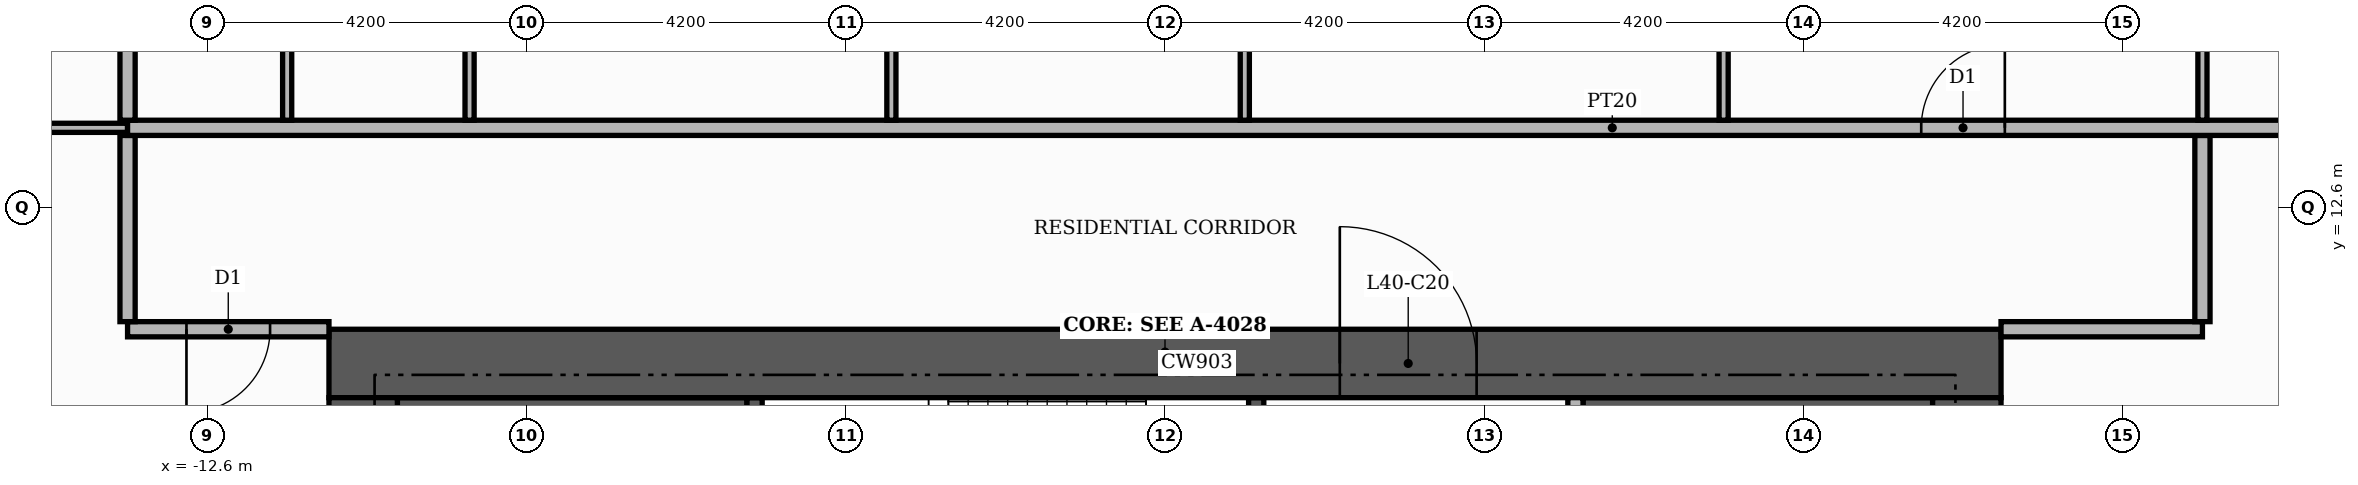
"""IFC4 building model, lengths in metres.
Left out: names, types, materials, properties, quantities, classifications, styles, units other than length and angle.
Written with IfcOpenShell. Run it as: python <this file> out.ifc"""

import sys

from ifc_helpers import new_model, si_unit, direction, frame, frame_2d, origin, place, context, subcontext, project, spatial, rectangle, extrude, element, fill, save


model = new_model("IFC4")
c1 = context("Model", 3, precision=1e-05, world=origin(), true_north=direction((0.0, 1.0)))
c2 = subcontext(c1, "Body", "Model", "MODEL_VIEW")
j1 = project(units=[si_unit("LENGTHUNIT", "METRE"), si_unit("PLANEANGLEUNIT", "RADIAN")], contexts=[c1])
p1 = place(None, origin())
s1 = spatial("IfcSite", under=j1, at=p1, CompositionType="ELEMENT")
p2 = place(p1, origin())
s2 = spatial("IfcBuilding", under=s1, at=p2, CompositionType="ELEMENT")
p3 = place(p2, frame((0.0, 0.0, 168.9)))
s3 = spatial("IfcBuildingStorey", under=s2, at=p3, CompositionType="ELEMENT", Elevation=168.9)
for number, where, z_axis, x_axis in (
    (1, (-10.1, 9.15, 0.0), (0.0, 0.0, 1.0), (1.0, 0.0, 0.0)),
    (2, (5.5, 9.15, 0.0), (0.0, 0.0, 1.0), (1.0, 0.0, 0.0)),
):
    element("IfcWall", number, at=place(p3, frame(where, z_axis=z_axis, x_axis=x_axis)), inside=s3, PredefinedType="SHEAR", context=c2, shape_type="SweptSolid", body=[
        extrude(rectangle(XDim=4.6, YDim=1.9, at=frame_2d((2.3, 0.0))), origin(), (0.0, 0.0, 1.0), 3.48),
    ])
p4 = place(p3, frame((-5.4, 7.25, 0.0), z_axis=(0.0, 0.0, 1.0), x_axis=(0.0, 1.0, 0.0)))
e3 = element("IfcWall", 3, at=p4, inside=s3, PredefinedType="SHEAR", context=c2, shape_type="SweptSolid", body=[
    extrude(rectangle(XDim=2.85, YDim=0.2, at=frame_2d((1.425, 0.0))), origin(), (0.0, 0.0, 1.0), 3.48),
])
p5 = place(p3, frame((1.2, 7.25, 0.0), z_axis=(0.0, 0.0, 1.0), x_axis=(0.0, 1.0, 0.0)))
e4 = element("IfcWall", 4, at=p5, inside=s3, PredefinedType="SHEAR", context=c2, shape_type="SweptSolid", body=[
    extrude(rectangle(XDim=2.85, YDim=0.2, at=frame_2d((1.425, 0.0))), origin(), (0.0, 0.0, 1.0), 3.48),
])
p6 = place(p5, frame((0.85, 0.0, 0.0)))
e5 = element("IfcOpeningElement", 5, at=p6, cuts=e4, PredefinedType="OPENING", context=c2, shape_type="SweptSolid", body=[
    extrude(rectangle(XDim=1.0, YDim=2.1, at=frame_2d((0.5, 1.05))), frame((0.0, 0.11, 0.0), z_axis=(0.0, -1.0, 0.0), x_axis=(1.0, 0.0, 0.0)), (0.0, 0.0, 1.0), 0.22),
])
p7 = place(p3, frame((-11.0, 10.55, 0.0), z_axis=(0.0, 0.0, 1.0), x_axis=(1.0, 0.0, 0.0)))
e6 = element("IfcWall", 6, at=p7, inside=s3, PredefinedType="SHEAR", context=c2, shape_type="SweptSolid", body=[
    extrude(rectangle(XDim=22.0, YDim=0.9, at=frame_2d((11.0, 0.0))), origin(), (0.0, 0.0, 1.0), 3.48),
])
p8 = place(p7, frame((13.3, 0.0, 0.0)))
e7 = element("IfcOpeningElement", 7, at=p8, cuts=e6, PredefinedType="OPENING", context=c2, shape_type="SweptSolid", body=[
    extrude(rectangle(XDim=1.8, YDim=2.2, at=frame_2d((0.9, 1.1))), frame((0.0, 0.46, 0.0), z_axis=(0.0, -1.0, 0.0), x_axis=(1.0, 0.0, 0.0)), (0.0, 0.0, 1.0), 0.92),
])
for number, where, z_axis, x_axis in (
    (8, (-10.55, -10.1, 0.0), (0.0, 0.0, 1.0), (0.0, 1.0, 0.0)),
    (9, (10.55, -10.1, 0.0), (0.0, 0.0, 1.0), (0.0, 1.0, 0.0)),
):
    element("IfcWall", number, at=place(p3, frame(where, z_axis=z_axis, x_axis=x_axis)), inside=s3, PredefinedType="SHEAR", context=c2, shape_type="SweptSolid", body=[
        extrude(rectangle(XDim=20.2, YDim=0.9, at=frame_2d((10.1, 0.0))), origin(), (0.0, 0.0, 1.0), 3.48),
    ])
p9 = place(p3, frame((5.4, 5.5, 0.0), z_axis=(0.0, 0.0, 1.0), x_axis=(0.0, 1.0, 0.0)))
e10 = element("IfcWall", 10, at=p9, inside=s3, PredefinedType="PARTITIONING", context=c2, shape_type="SweptSolid", body=[
    extrude(rectangle(XDim=4.6, YDim=0.2, at=frame_2d((2.3, 0.0))), origin(), (0.0, 0.0, 1.0), 3.48),
])
p10 = place(p9, frame((0.25, 0.0, 0.0)))
e11 = element("IfcOpeningElement", 11, at=p10, cuts=e10, PredefinedType="OPENING", context=c2, shape_type="SweptSolid", body=[
    extrude(rectangle(XDim=1.0, YDim=2.1, at=frame_2d((0.5, 1.05))), frame((0.0, 0.11, 0.0), z_axis=(0.0, -1.0, 0.0), x_axis=(1.0, 0.0, 0.0)), (0.0, 0.0, 1.0), 0.22),
])
p11 = place(p3, frame((-13.65, 11.0, 0.0), z_axis=(0.0, 0.0, 1.0), x_axis=(1.0, 0.0, 0.0)))
e12 = element("IfcWall", 12, at=p11, inside=s3, PredefinedType="PARTITIONING", context=c2, shape_type="SweptSolid", body=[
    extrude(rectangle(XDim=2.65, YDim=0.2, at=frame_2d((1.325, 0.0))), origin(), (0.0, 0.0, 1.0), 3.48),
])
p12 = place(p11, frame((0.775, 0.0, 0.0)))
e13 = element("IfcOpeningElement", 13, at=p12, cuts=e12, PredefinedType="OPENING", context=c2, shape_type="SweptSolid", body=[
    extrude(rectangle(XDim=1.1, YDim=2.4, at=frame_2d((0.55, 1.2))), frame((0.0, 0.11, 0.0), z_axis=(0.0, -1.0, 0.0), x_axis=(1.0, 0.0, 0.0)), (0.0, 0.0, 1.0), 0.22),
])
p13 = place(p3, frame((11.0, 11.0, 0.0), z_axis=(0.0, 0.0, 1.0), x_axis=(1.0, 0.0, 0.0)))
e14 = element("IfcWall", 14, at=p13, inside=s3, PredefinedType="PARTITIONING", context=c2, shape_type="SweptSolid", body=[
    extrude(rectangle(XDim=2.65, YDim=0.2, at=frame_2d((1.325, 0.0))), origin(), (0.0, 0.0, 1.0), 3.48),
])
for number, where, z_axis, x_axis in (
    (15, (-13.65, 11.1, 0.0), (0.0, 0.0, 1.0), (0.0, 1.0, 0.0)),
    (16, (13.65, 11.1, 0.0), (0.0, 0.0, 1.0), (0.0, 1.0, 0.0)),
):
    element("IfcWall", number, at=place(p3, frame(where, z_axis=z_axis, x_axis=x_axis)), inside=s3, PredefinedType="PARTITIONING", context=c2, shape_type="SweptSolid", body=[
        extrude(rectangle(XDim=2.45, YDim=0.2, at=frame_2d((1.225, 0.0))), origin(), (0.0, 0.0, 1.0), 3.48),
    ])
p14 = place(p3, frame((-20.72, 13.65, 0.0), z_axis=(0.0, 0.0, 1.0), x_axis=(1.0, 0.0, 0.0)))
e17 = element("IfcWall", 17, at=p14, inside=s3, PredefinedType="PARTITIONING", context=c2, shape_type="SweptSolid", body=[
    extrude(rectangle(XDim=7.07, YDim=0.12, at=frame_2d((3.535, 0.0))), origin(), (0.0, 0.0, 1.0), 3.48),
])
p15 = place(p14, frame((3.085, 0.0, 0.0)))
e18 = element("IfcOpeningElement", 18, at=p15, cuts=e17, PredefinedType="OPENING", context=c2, shape_type="SweptSolid", body=[
    extrude(rectangle(XDim=0.9, YDim=2.1, at=frame_2d((0.45, 1.05))), frame((0.0, 0.07, 0.0), z_axis=(0.0, -1.0, 0.0), x_axis=(1.0, 0.0, 0.0)), (0.0, 0.0, 1.0), 0.14),
])
p16 = place(p3, frame((-13.65, 13.65, 0.0), z_axis=(0.0, 0.0, 1.0), x_axis=(1.0, 0.0, 0.0)))
e19 = element("IfcWall", 19, at=p16, inside=s3, PredefinedType="PARTITIONING", context=c2, shape_type="SweptSolid", body=[
    extrude(rectangle(XDim=39.07, YDim=0.2, at=frame_2d((19.535, 0.0))), origin(), (0.0, 0.0, 1.0), 3.48),
])
p17 = place(p16, frame((23.6, 0.0, 0.0)))
e20 = element("IfcOpeningElement", 20, at=p17, cuts=e19, PredefinedType="OPENING", context=c2, shape_type="SweptSolid", body=[
    extrude(rectangle(XDim=1.1, YDim=2.4, at=frame_2d((0.55, 1.2))), frame((0.0, 0.11, 0.0), z_axis=(0.0, -1.0, 0.0), x_axis=(1.0, 0.0, 0.0)), (0.0, 0.0, 1.0), 0.22),
])
p18 = place(p3, frame((-13.65, 13.75, 0.0), z_axis=(0.0, 0.0, 1.0), x_axis=(0.0, 1.0, 0.0)))
e21 = element("IfcWall", 21, at=p18, inside=s3, PredefinedType="PARTITIONING", context=c2, shape_type="SweptSolid", body=[
    extrude(rectangle(XDim=11.67, YDim=0.2, at=frame_2d((5.835, 0.0))), origin(), (0.0, 0.0, 1.0), 3.48),
])
for number, where, z_axis, x_axis in (
    (22, (-11.55, 13.75, 0.0), (0.0, 0.0, 1.0), (0.0, 1.0, 0.0)),
    (23, (-9.15, 13.75, 0.0), (0.0, 0.0, 1.0), (0.0, 1.0, 0.0)),
    (24, (-3.6, 13.75, 0.0), (0.0, 0.0, 1.0), (0.0, 1.0, 0.0)),
    (25, (1.05, 13.75, 0.0), (0.0, 0.0, 1.0), (0.0, 1.0, 0.0)),
    (26, (7.35, 13.75, 0.0), (0.0, 0.0, 1.0), (0.0, 1.0, 0.0)),
):
    element("IfcWall", number, at=place(p3, frame(where, z_axis=z_axis, x_axis=x_axis)), inside=s3, PredefinedType="PARTITIONING", context=c2, shape_type="SweptSolid", body=[
        extrude(rectangle(XDim=5.41, YDim=0.12, at=frame_2d((2.705, 0.0))), origin(), (0.0, 0.0, 1.0), 3.48),
    ])
p19 = place(p3, frame((13.65, 13.75, 0.0), z_axis=(0.0, 0.0, 1.0), x_axis=(0.0, 1.0, 0.0)))
e27 = element("IfcWall", 27, at=p19, inside=s3, PredefinedType="PARTITIONING", context=c2, shape_type="SweptSolid", body=[
    extrude(rectangle(XDim=6.91, YDim=0.12, at=frame_2d((3.455, 0.0))), origin(), (0.0, 0.0, 1.0), 3.48),
])
p20 = place(p19, frame((2.985, 0.0, 0.0)))
e28 = element("IfcOpeningElement", 28, at=p20, cuts=e27, PredefinedType="OPENING", context=c2, shape_type="SweptSolid", body=[
    extrude(rectangle(XDim=0.9, YDim=2.1, at=frame_2d((0.45, 1.05))), frame((0.0, 0.07, 0.0), z_axis=(0.0, -1.0, 0.0), x_axis=(1.0, 0.0, 0.0)), (0.0, 0.0, 1.0), 0.14),
])
p21 = place(p8, origin())
e29 = element("IfcDoor", 29, at=p21, inside=s3, OperationType="DOUBLE_DOOR_SINGLE_SWING", PredefinedType="DOOR", context=c2, shape_type="SweptSolid", body=[
    extrude(rectangle(XDim=1.8, YDim=2.2, at=frame_2d((0.9, 1.1))), frame((0.0, 0.025, 0.0), z_axis=(0.0, -1.0, 0.0), x_axis=(1.0, 0.0, 0.0)), (0.0, 0.0, 1.0), 0.05),
])
fill(e7, e29)
p22 = place(p17, origin())
e30 = element("IfcDoor", 30, at=p22, inside=s3, OperationType="SINGLE_SWING_RIGHT", PredefinedType="DOOR", context=c2, shape_type="SweptSolid", body=[
    extrude(rectangle(XDim=1.1, YDim=2.4, at=frame_2d((0.55, 1.2))), frame((0.0, 0.025, 0.0), z_axis=(0.0, -1.0, 0.0), x_axis=(1.0, 0.0, 0.0)), (0.0, 0.0, 1.0), 0.05),
])
fill(e20, e30)
p23 = place(p12, frame((1.1, 0.0, 0.0), z_axis=(0.0, 0.0, 1.0), x_axis=(-1.0, 0.0, 0.0)))
e31 = element("IfcDoor", 31, at=p23, inside=s3, OperationType="SINGLE_SWING_LEFT", PredefinedType="DOOR", context=c2, shape_type="SweptSolid", body=[
    extrude(rectangle(XDim=1.1, YDim=2.4, at=frame_2d((0.55, 1.2))), frame((0.0, 0.025, 0.0), z_axis=(0.0, -1.0, 0.0), x_axis=(1.0, 0.0, 0.0)), (0.0, 0.0, 1.0), 0.05),
])
fill(e13, e31)
save(model, sys.argv[1])
